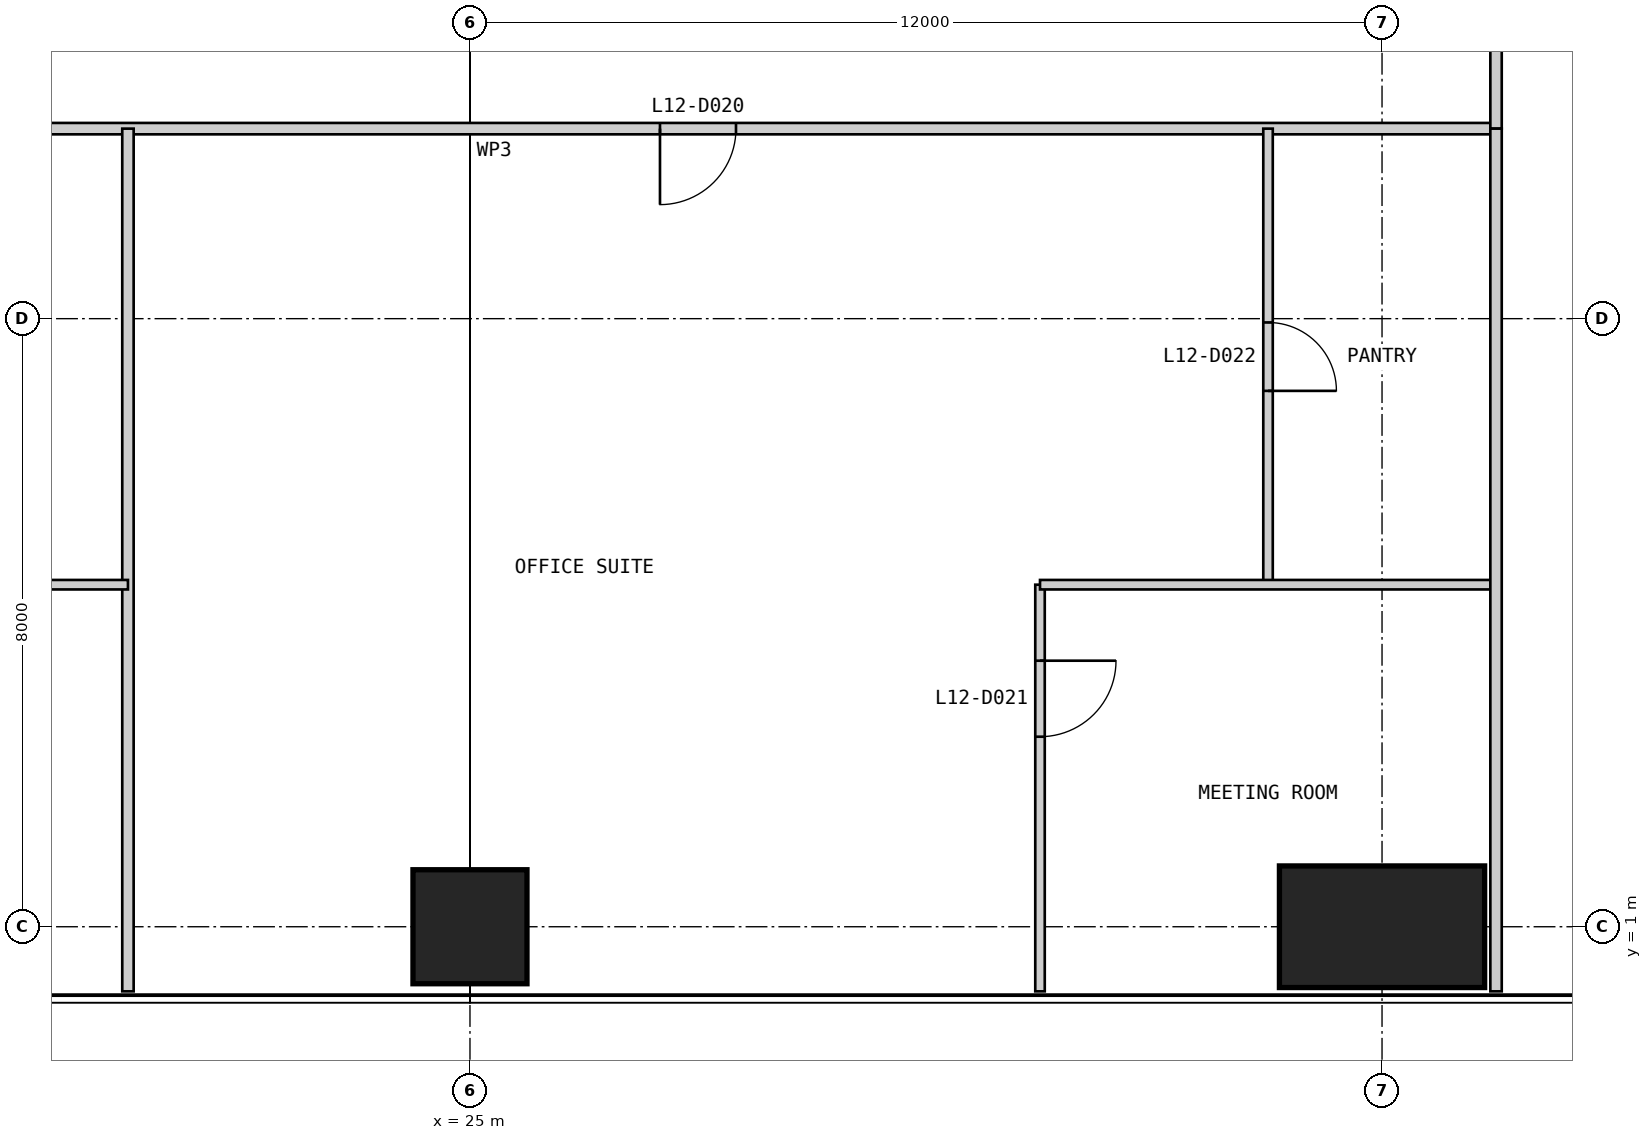
"""IFC4 building model, lengths in metres.
Left out: names, types, materials, properties, quantities, classifications, styles, units other than length and angle.
Written with IfcOpenShell. Run it as: python <this file> out.ifc"""

import sys

from ifc_helpers import new_model, si_unit, direction, frame, frame_2d, origin, origin_2d, place, context, subcontext, project, spatial, rectangle, extrude, element, fill, save


model = new_model("IFC4")
c1 = context("Model", 3, precision=1e-05, world=origin(), true_north=direction((0.0, 1.0)))
c2 = subcontext(c1, "Body", "Model", "MODEL_VIEW")
j1 = project(units=[si_unit("LENGTHUNIT", "METRE"), si_unit("PLANEANGLEUNIT", "RADIAN")], contexts=[c1])
p1 = place(None, origin())
s1 = spatial("IfcSite", under=j1, at=p1, CompositionType="ELEMENT")
p2 = place(p1, origin())
s2 = spatial("IfcBuilding", under=s1, at=p2, CompositionType="ELEMENT")
p3 = place(p2, frame((0.0, 0.0, 55.0)))
s3 = spatial("IfcBuildingStorey", under=s2, at=p3, CompositionType="ELEMENT", Elevation=55.0)
p4 = place(p3, frame((25.0, 1.0, 0.0), z_axis=(0.0, 0.0, 1.0), x_axis=(1.0, 0.0, 0.0)))
e1 = element("IfcColumn", 1, at=p4, inside=s3, PredefinedType="COLUMN", context=c2, shape_type="SweptSolid", body=[
    extrude(rectangle(XDim=1.5, YDim=1.5, at=origin_2d()), origin(), (0.0, 0.0, 1.0), 4.0),
])
p5 = place(p3, frame((37.0, 1.0, 0.0), z_axis=(0.0, 0.0, 1.0), x_axis=(1.0, 0.0, 0.0)))
e2 = element("IfcColumn", 2, at=p5, inside=s3, PredefinedType="COLUMN", context=c2, shape_type="SweptSolid", body=[
    extrude(rectangle(XDim=2.7, YDim=1.6, at=origin_2d()), origin(), (0.0, 0.0, 1.0), 4.0),
])
p6 = place(p3, frame((11.5, 11.5, 0.0), z_axis=(0.0, 0.0, 1.0), x_axis=(1.0, 0.0, 0.0)))
e3 = element("IfcWall", 3, at=p6, inside=s3, PredefinedType="PARTITIONING", context=c2, shape_type="SweptSolid", body=[
    extrude(rectangle(XDim=27.0, YDim=0.15, at=frame_2d((13.5, 0.0))), origin(), (0.0, 0.0, 1.0), 3.85),
])
p7 = place(p6, frame((2.5, 0.0, 0.0)))
e4 = element("IfcOpeningElement", 4, at=p7, cuts=e3, PredefinedType="OPENING", context=c2, shape_type="SweptSolid", body=[
    extrude(rectangle(XDim=1.0, YDim=2.2, at=frame_2d((0.5, 1.1))), frame((0.0, 0.085, 0.0), z_axis=(0.0, -1.0, 0.0), x_axis=(1.0, 0.0, 0.0)), (0.0, 0.0, 1.0), 0.17),
])
p8 = place(p6, frame((16.0, 0.0, 0.0)))
e5 = element("IfcOpeningElement", 5, at=p8, cuts=e3, PredefinedType="OPENING", context=c2, shape_type="SweptSolid", body=[
    extrude(rectangle(XDim=1.0, YDim=2.2, at=frame_2d((0.5, 1.1))), frame((0.0, 0.085, 0.0), z_axis=(0.0, -1.0, 0.0), x_axis=(1.0, 0.0, 0.0)), (0.0, 0.0, 1.0), 0.17),
])
p9 = place(p3, frame((20.5, 0.15, 0.0), z_axis=(0.0, 0.0, 1.0), x_axis=(0.0, 1.0, 0.0)))
e6 = element("IfcWall", 6, at=p9, inside=s3, PredefinedType="PARTITIONING", context=c2, shape_type="SweptSolid", body=[
    extrude(rectangle(XDim=11.35, YDim=0.15, at=frame_2d((5.675, 0.0))), origin(), (0.0, 0.0, 1.0), 3.85),
])
p10 = place(p3, frame((32.5, 0.15, 0.0), z_axis=(0.0, 0.0, 1.0), x_axis=(0.0, 1.0, 0.0)))
e7 = element("IfcWall", 7, at=p10, inside=s3, PredefinedType="PARTITIONING", context=c2, shape_type="SweptSolid", body=[
    extrude(rectangle(XDim=5.35, YDim=0.125, at=frame_2d((2.675, 0.0))), origin(), (0.0, 0.0, 1.0), 3.85),
])
p11 = place(p10, frame((3.35, 0.0, 0.0)))
e8 = element("IfcOpeningElement", 8, at=p11, cuts=e7, PredefinedType="OPENING", context=c2, shape_type="SweptSolid", body=[
    extrude(rectangle(XDim=1.0, YDim=2.2, at=frame_2d((0.5, 1.1))), frame((0.0, 0.073, 0.0), z_axis=(0.0, -1.0, 0.0), x_axis=(1.0, 0.0, 0.0)), (0.0, 0.0, 1.0), 0.145),
])
p12 = place(p3, frame((35.5, 5.5, 0.0), z_axis=(0.0, 0.0, 1.0), x_axis=(0.0, 1.0, 0.0)))
e9 = element("IfcWall", 9, at=p12, inside=s3, PredefinedType="PARTITIONING", context=c2, shape_type="SweptSolid", body=[
    extrude(rectangle(XDim=6.0, YDim=0.125, at=frame_2d((3.0, 0.0))), origin(), (0.0, 0.0, 1.0), 3.85),
])
p13 = place(p12, frame((2.55, 0.0, 0.0)))
e10 = element("IfcOpeningElement", 10, at=p13, cuts=e9, PredefinedType="OPENING", context=c2, shape_type="SweptSolid", body=[
    extrude(rectangle(XDim=0.9, YDim=2.2, at=frame_2d((0.45, 1.1))), frame((0.0, 0.073, 0.0), z_axis=(0.0, -1.0, 0.0), x_axis=(1.0, 0.0, 0.0)), (0.0, 0.0, 1.0), 0.145),
])
p14 = place(p3, frame((17.5, 5.5, 0.0), z_axis=(0.0, 0.0, 1.0), x_axis=(1.0, 0.0, 0.0)))
e11 = element("IfcWall", 11, at=p14, inside=s3, PredefinedType="PARTITIONING", context=c2, shape_type="SweptSolid", body=[
    extrude(rectangle(XDim=3.0, YDim=0.125, at=frame_2d((1.5, 0.0))), origin(), (0.0, 0.0, 1.0), 3.85),
])
p15 = place(p3, frame((32.5, 5.5, 0.0), z_axis=(0.0, 0.0, 1.0), x_axis=(1.0, 0.0, 0.0)))
e12 = element("IfcWall", 12, at=p15, inside=s3, PredefinedType="PARTITIONING", context=c2, shape_type="SweptSolid", body=[
    extrude(rectangle(XDim=6.0, YDim=0.125, at=frame_2d((3.0, 0.0))), origin(), (0.0, 0.0, 1.0), 3.85),
])
p16 = place(p3, frame((38.5, 11.5, 0.0), z_axis=(0.0, 0.0, 1.0), x_axis=(0.0, 1.0, 0.0)))
e13 = element("IfcWall", 13, at=p16, inside=s3, PredefinedType="PARTITIONING", context=c2, shape_type="SweptSolid", body=[
    extrude(rectangle(XDim=27.0, YDim=0.15, at=frame_2d((13.5, 0.0))), origin(), (0.0, 0.0, 1.0), 3.85),
])
p17 = place(p16, frame((2.5, 0.0, 0.0)))
e14 = element("IfcOpeningElement", 14, at=p17, cuts=e13, PredefinedType="OPENING", context=c2, shape_type="SweptSolid", body=[
    extrude(rectangle(XDim=1.0, YDim=2.2, at=frame_2d((0.5, 1.1))), frame((0.0, 0.085, 0.0), z_axis=(0.0, -1.0, 0.0), x_axis=(1.0, 0.0, 0.0)), (0.0, 0.0, 1.0), 0.17),
])
p18 = place(p16, frame((16.0, 0.0, 0.0)))
e15 = element("IfcOpeningElement", 15, at=p18, cuts=e13, PredefinedType="OPENING", context=c2, shape_type="SweptSolid", body=[
    extrude(rectangle(XDim=1.0, YDim=2.2, at=frame_2d((0.5, 1.1))), frame((0.0, 0.085, 0.0), z_axis=(0.0, -1.0, 0.0), x_axis=(1.0, 0.0, 0.0)), (0.0, 0.0, 1.0), 0.17),
])
p19 = place(p3, frame((38.5, 0.15, 0.0), z_axis=(0.0, 0.0, 1.0), x_axis=(0.0, 1.0, 0.0)))
e16 = element("IfcWall", 16, at=p19, inside=s3, PredefinedType="PARTITIONING", context=c2, shape_type="SweptSolid", body=[
    extrude(rectangle(XDim=11.35, YDim=0.15, at=frame_2d((5.675, 0.0))), origin(), (0.0, 0.0, 1.0), 3.85),
])
p20 = place(p8, frame((1.0, 0.0, 0.0), z_axis=(0.0, 0.0, 1.0), x_axis=(-1.0, 0.0, 0.0)))
e17 = element("IfcDoor", 17, at=p20, inside=s3, OperationType="SINGLE_SWING_RIGHT", PredefinedType="DOOR", context=c2, shape_type="SweptSolid", body=[
    extrude(rectangle(XDim=1.0, YDim=2.2, at=frame_2d((0.5, 1.1))), frame((0.0, 0.025, 0.0), z_axis=(0.0, -1.0, 0.0), x_axis=(1.0, 0.0, 0.0)), (0.0, 0.0, 1.0), 0.05),
])
fill(e5, e17)
p21 = place(p11, frame((1.0, 0.0, 0.0), z_axis=(0.0, 0.0, 1.0), x_axis=(-1.0, 0.0, 0.0)))
e18 = element("IfcDoor", 18, at=p21, inside=s3, OperationType="SINGLE_SWING_LEFT", PredefinedType="DOOR", context=c2, shape_type="SweptSolid", body=[
    extrude(rectangle(XDim=1.0, YDim=2.2, at=frame_2d((0.5, 1.1))), frame((0.0, 0.025, 0.0), z_axis=(0.0, -1.0, 0.0), x_axis=(1.0, 0.0, 0.0)), (0.0, 0.0, 1.0), 0.05),
])
fill(e8, e18)
p22 = place(p13, frame((0.9, 0.0, 0.0), z_axis=(0.0, 0.0, 1.0), x_axis=(-1.0, 0.0, 0.0)))
e19 = element("IfcDoor", 19, at=p22, inside=s3, OperationType="SINGLE_SWING_RIGHT", PredefinedType="DOOR", context=c2, shape_type="SweptSolid", body=[
    extrude(rectangle(XDim=0.9, YDim=2.2, at=frame_2d((0.45, 1.1))), frame((0.0, 0.025, 0.0), z_axis=(0.0, -1.0, 0.0), x_axis=(1.0, 0.0, 0.0)), (0.0, 0.0, 1.0), 0.05),
])
fill(e10, e19)
save(model, sys.argv[1])
